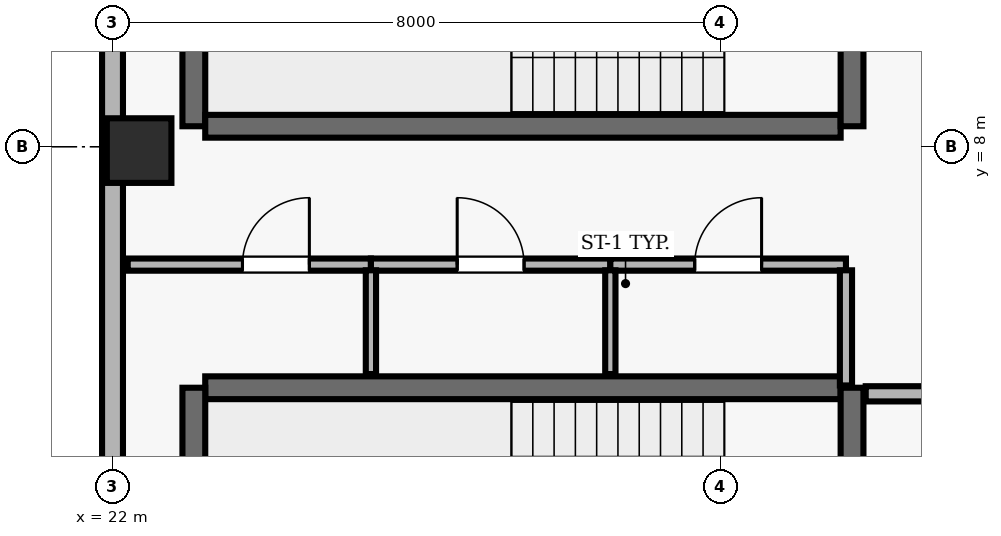
"""IFC4 building model, lengths in metres.
Left out: names, types, materials, properties, quantities, classifications, styles, units other than length and angle.
Written with IfcOpenShell. Run it as: python <this file> out.ifc"""

import sys

from ifc_helpers import new_model, si_unit, direction, frame, frame_2d, origin, origin_2d, place, context, subcontext, project, spatial, rectangle, extrude, element, fill, save


model = new_model("IFC4")
c1 = context("Model", 3, precision=1e-05, world=origin(), true_north=direction((0.0, 1.0)))
c2 = subcontext(c1, "Body", "Model", "MODEL_VIEW")
j1 = project(units=[si_unit("LENGTHUNIT", "METRE"), si_unit("PLANEANGLEUNIT", "RADIAN")], contexts=[c1])
p1 = place(None, origin())
s1 = spatial("IfcSite", under=j1, at=p1, CompositionType="ELEMENT")
p2 = place(p1, origin())
s2 = spatial("IfcBuilding", under=s1, at=p2, CompositionType="ELEMENT")
p3 = place(p2, frame((0.0, 0.0, 248.2)))
s3 = spatial("IfcBuildingStorey", under=s2, at=p3, CompositionType="ELEMENT", Elevation=248.2)
p4 = place(p3, frame((22.35, 7.95, 0.0), z_axis=(0.0, 0.0, 1.0), x_axis=(1.0, 0.0, 0.0)))
e1 = element("IfcColumn", 1, at=p4, inside=s3, PredefinedType="COLUMN", context=c2, shape_type="SweptSolid", body=[
    extrude(rectangle(XDim=0.85, YDim=0.85, at=origin_2d()), origin(), (0.0, 0.0, 1.0), 3.9),
])
p5 = place(p3, frame((22.0, 35.3, 0.0), z_axis=(0.0, 0.0, 1.0), x_axis=(0.0, -1.0, 0.0)))
e2 = element("IfcWall", 2, at=p5, inside=s3, PredefinedType="SOLIDWALL", context=c2, shape_type="SweptSolid", body=[
    extrude(rectangle(XDim=32.8, YDim=0.275, at=frame_2d((16.4, 0.0))), origin(), (0.0, 0.0, 1.0), 3.69),
])
p6 = place(p5, frame((7.3, 0.0, 0.0)))
e3 = element("IfcOpeningElement", 3, at=p6, cuts=e2, PredefinedType="OPENING", context=c2, shape_type="SweptSolid", body=[
    extrude(rectangle(XDim=1.0, YDim=2.2, at=frame_2d((0.5, 1.1))), frame((0.0, 0.147, 0.0), z_axis=(0.0, -1.0, 0.0), x_axis=(1.0, 0.0, 0.0)), (0.0, 0.0, 1.0), 0.295),
])
p7 = place(p5, frame((2.133, 0.0, 0.9)))
e4 = element("IfcOpeningElement", 4, at=p7, cuts=e2, PredefinedType="OPENING", context=c2, shape_type="SweptSolid", body=[
    extrude(rectangle(XDim=1.2, YDim=1.6, at=frame_2d((0.6, 0.8))), frame((0.0, 0.147, 0.0), z_axis=(0.0, -1.0, 0.0), x_axis=(1.0, 0.0, 0.0)), (0.0, 0.0, 1.0), 0.295),
])
p8 = place(p5, frame((13.067, 0.0, 0.9)))
e5 = element("IfcOpeningElement", 5, at=p8, cuts=e2, PredefinedType="OPENING", context=c2, shape_type="SweptSolid", body=[
    extrude(rectangle(XDim=1.2, YDim=1.6, at=frame_2d((0.6, 0.8))), frame((0.0, 0.147, 0.0), z_axis=(0.0, -1.0, 0.0), x_axis=(1.0, 0.0, 0.0)), (0.0, 0.0, 1.0), 0.295),
])
p9 = place(p5, frame((18.533, 0.0, 0.9)))
e6 = element("IfcOpeningElement", 6, at=p9, cuts=e2, PredefinedType="OPENING", context=c2, shape_type="SweptSolid", body=[
    extrude(rectangle(XDim=1.2, YDim=1.6, at=frame_2d((0.6, 0.8))), frame((0.0, 0.147, 0.0), z_axis=(0.0, -1.0, 0.0), x_axis=(1.0, 0.0, 0.0)), (0.0, 0.0, 1.0), 0.295),
])
p10 = place(p5, frame((24.0, 0.0, 0.9)))
e7 = element("IfcOpeningElement", 7, at=p10, cuts=e2, PredefinedType="OPENING", context=c2, shape_type="SweptSolid", body=[
    extrude(rectangle(XDim=1.2, YDim=1.6, at=frame_2d((0.6, 0.8))), frame((0.0, 0.147, 0.0), z_axis=(0.0, -1.0, 0.0), x_axis=(1.0, 0.0, 0.0)), (0.0, 0.0, 1.0), 0.295),
])
p11 = place(p3, frame((31.58, 4.83, 0.0), z_axis=(0.0, 0.0, 1.0), x_axis=(-1.0, 0.0, 0.0)))
e8 = element("IfcWall", 8, at=p11, inside=s3, PredefinedType="SHEAR", context=c2, shape_type="SweptSolid", body=[
    extrude(rectangle(XDim=8.36, YDim=0.3, at=frame_2d((4.18, 0.0))), origin(), (0.0, 0.0, 1.0), 3.69),
])
p12 = place(p3, frame((23.07, 4.83, 0.0), z_axis=(0.0, 0.0, 1.0), x_axis=(0.0, -1.0, 0.0)))
e9 = element("IfcWall", 9, at=p12, inside=s3, PredefinedType="SHEAR", context=c2, shape_type="SweptSolid", body=[
    extrude(rectangle(XDim=3.51, YDim=0.3, at=frame_2d((1.755, 0.0))), origin(), (0.0, 0.0, 1.0), 3.69),
])
p13 = place(p3, frame((31.73, 0.96, 0.0), z_axis=(0.0, 0.0, 1.0), x_axis=(0.0, 1.0, 0.0)))
e10 = element("IfcWall", 10, at=p13, inside=s3, PredefinedType="SHEAR", context=c2, shape_type="SweptSolid", body=[
    extrude(rectangle(XDim=3.87, YDim=0.3, at=frame_2d((1.935, 0.0))), origin(), (0.0, 0.0, 1.0), 3.69),
])
p14 = place(p13, frame((1.54, 0.0, 0.0)))
e11 = element("IfcOpeningElement", 11, at=p14, cuts=e10, PredefinedType="OPENING", context=c2, shape_type="SweptSolid", body=[
    extrude(rectangle(XDim=1.15, YDim=2.15, at=frame_2d((0.575, 1.075))), frame((0.0, 0.16, 0.0), z_axis=(0.0, -1.0, 0.0), x_axis=(1.0, 0.0, 0.0)), (0.0, 0.0, 1.0), 0.32),
])
p15 = place(p3, frame((23.07, 11.78, 0.0), z_axis=(0.0, 0.0, 1.0), x_axis=(0.0, -1.0, 0.0)))
e12 = element("IfcWall", 12, at=p15, inside=s3, PredefinedType="SHEAR", context=c2, shape_type="SweptSolid", body=[
    extrude(rectangle(XDim=3.51, YDim=0.3, at=frame_2d((1.755, 0.0))), origin(), (0.0, 0.0, 1.0), 3.69),
])
p16 = place(p3, frame((23.22, 8.27, 0.0), z_axis=(0.0, 0.0, 1.0), x_axis=(1.0, 0.0, 0.0)))
e13 = element("IfcWall", 13, at=p16, inside=s3, PredefinedType="SHEAR", context=c2, shape_type="SweptSolid", body=[
    extrude(rectangle(XDim=8.36, YDim=0.3, at=frame_2d((4.18, 0.0))), origin(), (0.0, 0.0, 1.0), 3.69),
])
p17 = place(p3, frame((31.73, 8.27, 0.0), z_axis=(0.0, 0.0, 1.0), x_axis=(0.0, 1.0, 0.0)))
e14 = element("IfcWall", 14, at=p17, inside=s3, PredefinedType="SHEAR", context=c2, shape_type="SweptSolid", body=[
    extrude(rectangle(XDim=3.51, YDim=0.3, at=frame_2d((1.755, 0.0))), origin(), (0.0, 0.0, 1.0), 3.69),
])
p18 = place(p17, frame((1.18, 0.0, 0.0)))
e15 = element("IfcOpeningElement", 15, at=p18, cuts=e14, PredefinedType="OPENING", context=c2, shape_type="SweptSolid", body=[
    extrude(rectangle(XDim=1.15, YDim=2.15, at=frame_2d((0.575, 1.075))), frame((0.0, 0.16, 0.0), z_axis=(0.0, -1.0, 0.0), x_axis=(1.0, 0.0, 0.0)), (0.0, 0.0, 1.0), 0.32),
])
p19 = place(p3, frame((22.2, 6.45, 0.0), z_axis=(0.0, 0.0, 1.0), x_axis=(1.0, 0.0, 0.0)))
e16 = element("IfcWall", 16, at=p19, inside=s3, PredefinedType="PARTITIONING", context=c2, shape_type="SweptSolid", body=[
    extrude(rectangle(XDim=3.2, YDim=0.16, at=frame_2d((1.6, 0.0))), origin(), (0.0, 0.0, 1.0), 3.69),
])
p20 = place(p19, frame((1.51, 0.0, 0.0)))
e17 = element("IfcOpeningElement", 17, at=p20, cuts=e16, PredefinedType="OPENING", context=c2, shape_type="SweptSolid", body=[
    extrude(rectangle(XDim=0.88, YDim=2.1, at=frame_2d((0.44, 1.05))), frame((0.0, 0.09, 0.0), z_axis=(0.0, -1.0, 0.0), x_axis=(1.0, 0.0, 0.0)), (0.0, 0.0, 1.0), 0.18),
])
p21 = place(p3, frame((25.4, 6.45, 0.0), z_axis=(0.0, 0.0, 1.0), x_axis=(1.0, 0.0, 0.0)))
e18 = element("IfcWall", 18, at=p21, inside=s3, PredefinedType="PARTITIONING", context=c2, shape_type="SweptSolid", body=[
    extrude(rectangle(XDim=3.15, YDim=0.16, at=frame_2d((1.575, 0.0))), origin(), (0.0, 0.0, 1.0), 3.69),
])
p22 = place(p21, frame((1.135, 0.0, 0.0)))
e19 = element("IfcOpeningElement", 19, at=p22, cuts=e18, PredefinedType="OPENING", context=c2, shape_type="SweptSolid", body=[
    extrude(rectangle(XDim=0.88, YDim=2.1, at=frame_2d((0.44, 1.05))), frame((0.0, 0.09, 0.0), z_axis=(0.0, -1.0, 0.0), x_axis=(1.0, 0.0, 0.0)), (0.0, 0.0, 1.0), 0.18),
])
p23 = place(p3, frame((28.55, 6.45, 0.0), z_axis=(0.0, 0.0, 1.0), x_axis=(1.0, 0.0, 0.0)))
e20 = element("IfcWall", 20, at=p23, inside=s3, PredefinedType="PARTITIONING", context=c2, shape_type="SweptSolid", body=[
    extrude(rectangle(XDim=3.1, YDim=0.16, at=frame_2d((1.55, 0.0))), origin(), (0.0, 0.0, 1.0), 3.69),
])
p24 = place(p23, frame((1.11, 0.0, 0.0)))
e21 = element("IfcOpeningElement", 21, at=p24, cuts=e20, PredefinedType="OPENING", context=c2, shape_type="SweptSolid", body=[
    extrude(rectangle(XDim=0.88, YDim=2.1, at=frame_2d((0.44, 1.05))), frame((0.0, 0.09, 0.0), z_axis=(0.0, -1.0, 0.0), x_axis=(1.0, 0.0, 0.0)), (0.0, 0.0, 1.0), 0.18),
])
p25 = place(p3, frame((35.02, 4.75, 0.0), z_axis=(0.0, 0.0, 1.0), x_axis=(-1.0, 0.0, 0.0)))
e22 = element("IfcWall", 22, at=p25, inside=s3, PredefinedType="SOLIDWALL", context=c2, shape_type="SweptSolid", body=[
    extrude(rectangle(XDim=3.11, YDim=0.2, at=frame_2d((1.555, 0.0))), origin(), (0.0, 0.0, 1.0), 3.69),
])
p26 = place(p25, frame((1.03, 0.0, 0.0)))
e23 = element("IfcOpeningElement", 23, at=p26, cuts=e22, PredefinedType="OPENING", context=c2, shape_type="SweptSolid", body=[
    extrude(rectangle(XDim=1.05, YDim=2.15, at=frame_2d((0.525, 1.075))), frame((0.0, 0.11, 0.0), z_axis=(0.0, -1.0, 0.0), x_axis=(1.0, 0.0, 0.0)), (0.0, 0.0, 1.0), 0.22),
])
for number, where, z_axis, x_axis in (
    (24, (25.4, 5.01, 0.0), (0.0, 0.0, 1.0), (0.0, 1.0, 0.0)),
    (25, (28.55, 5.01, 0.0), (0.0, 0.0, 1.0), (0.0, 1.0, 0.0)),
):
    element("IfcWall", number, at=place(p3, frame(where, z_axis=z_axis, x_axis=x_axis)), inside=s3, PredefinedType="PARTITIONING", context=c2, shape_type="SweptSolid", body=[
        extrude(rectangle(XDim=1.365, YDim=0.135, at=frame_2d((0.683, 0.0))), origin(), (0.0, 0.0, 1.0), 3.69),
    ])
p27 = place(p3, frame((31.65, 4.86, 0.0), z_axis=(0.0, 0.0, 1.0), x_axis=(0.0, 1.0, 0.0)))
e26 = element("IfcWall", 26, at=p27, inside=s3, PredefinedType="PARTITIONING", context=c2, shape_type="SweptSolid", body=[
    extrude(rectangle(XDim=1.515, YDim=0.16, at=frame_2d((0.757, 0.0))), origin(), (0.0, 0.0, 1.0), 3.69),
])
p28 = place(p20, origin())
e27 = element("IfcDoor", 27, at=p28, inside=s3, OperationType="SINGLE_SWING_RIGHT", PredefinedType="DOOR", context=c2, shape_type="SweptSolid", body=[
    extrude(rectangle(XDim=0.88, YDim=2.1, at=frame_2d((0.44, 1.05))), frame((0.0, 0.025, 0.0), z_axis=(0.0, -1.0, 0.0), x_axis=(1.0, 0.0, 0.0)), (0.0, 0.0, 1.0), 0.05),
])
fill(e17, e27)
p29 = place(p22, origin())
e28 = element("IfcDoor", 28, at=p29, inside=s3, OperationType="SINGLE_SWING_LEFT", PredefinedType="DOOR", context=c2, shape_type="SweptSolid", body=[
    extrude(rectangle(XDim=0.88, YDim=2.1, at=frame_2d((0.44, 1.05))), frame((0.0, 0.025, 0.0), z_axis=(0.0, -1.0, 0.0), x_axis=(1.0, 0.0, 0.0)), (0.0, 0.0, 1.0), 0.05),
])
fill(e19, e28)
p30 = place(p24, origin())
e29 = element("IfcDoor", 29, at=p30, inside=s3, OperationType="SINGLE_SWING_RIGHT", PredefinedType="DOOR", context=c2, shape_type="SweptSolid", body=[
    extrude(rectangle(XDim=0.88, YDim=2.1, at=frame_2d((0.44, 1.05))), frame((0.0, 0.025, 0.0), z_axis=(0.0, -1.0, 0.0), x_axis=(1.0, 0.0, 0.0)), (0.0, 0.0, 1.0), 0.05),
])
fill(e21, e29)
save(model, sys.argv[1])
